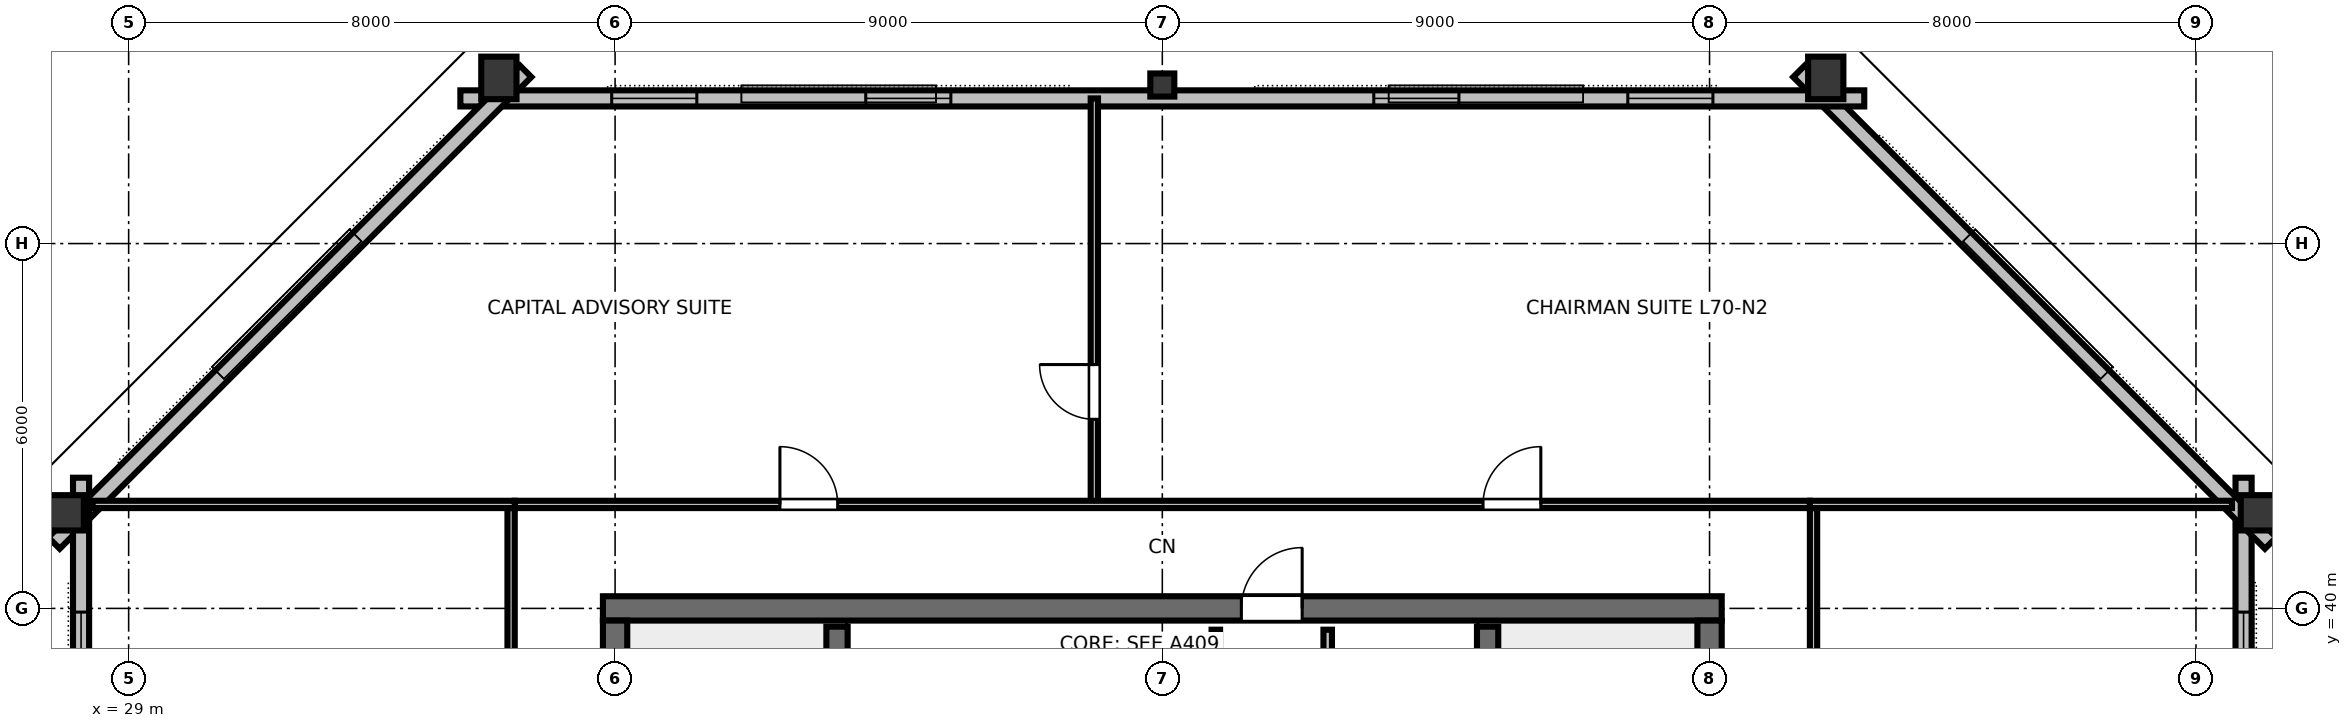
"""IFC4 building model, lengths in metres.
Left out: names, types, materials, properties, quantities, classifications, styles, units other than length and angle.
Written with IfcOpenShell. Run it as: python <this file> out.ifc"""

import sys

from ifc_helpers import new_model, si_unit, direction, frame, frame_2d, origin, origin_2d, place, context, subcontext, project, spatial, rectangle, hollow_rectangle, i_section, extrude, element, fill, save


model = new_model("IFC4")
c1 = context("Model", 3, precision=1e-05, world=origin(), true_north=direction((0.0, 1.0)))
c2 = subcontext(c1, "Body", "Model", "MODEL_VIEW")
j1 = project(units=[si_unit("LENGTHUNIT", "METRE"), si_unit("PLANEANGLEUNIT", "RADIAN")], contexts=[c1])
p1 = place(None, origin())
s1 = spatial("IfcSite", under=j1, at=p1, CompositionType="ELEMENT")
p2 = place(p1, origin())
s2 = spatial("IfcBuilding", under=s1, at=p2, CompositionType="ELEMENT")
p3 = place(p2, frame((0.0, 0.0, 264.6)))
s3 = spatial("IfcBuildingStorey", under=s2, at=p3, CompositionType="ELEMENT", Elevation=264.6)
p4 = place(p3, frame((36.8, 40.0, 0.0), z_axis=(0.0, 0.0, 1.0), x_axis=(1.0, 0.0, 0.0)))
e1 = element("IfcWall", 1, at=p4, inside=s3, PredefinedType="SHEAR", context=c2, shape_type="SweptSolid", body=[
    extrude(rectangle(XDim=18.4, YDim=0.4, at=frame_2d((9.2, 0.0))), origin(), (0.0, 0.0, 1.0), 3.36),
])
p5 = place(p4, frame((10.5, 0.0, 0.0)))
e2 = element("IfcOpeningElement", 2, at=p5, cuts=e1, PredefinedType="OPENING", context=c2, shape_type="SweptSolid", body=[
    extrude(rectangle(XDim=1.0, YDim=2.15, at=frame_2d((0.5, 1.075))), frame((0.0, 0.21, 0.0), z_axis=(0.0, -1.0, 0.0), x_axis=(1.0, 0.0, 0.0)), (0.0, 0.0, 1.0), 0.42),
])
p6 = place(p3, frame((37.0, 24.2, 0.0), z_axis=(0.0, 0.0, 1.0), x_axis=(0.0, 1.0, 0.0)))
e3 = element("IfcWall", 3, at=p6, inside=s3, PredefinedType="SHEAR", context=c2, shape_type="SweptSolid", body=[
    extrude(rectangle(XDim=15.6, YDim=0.4, at=frame_2d((7.8, 0.0))), origin(), (0.0, 0.0, 1.0), 3.36),
])
p7 = place(p6, frame((5.325, 0.0, 0.0)))
e4 = element("IfcOpeningElement", 4, at=p7, cuts=e3, PredefinedType="OPENING", context=c2, shape_type="SweptSolid", body=[
    extrude(rectangle(XDim=1.15, YDim=2.15, at=frame_2d((0.575, 1.075))), frame((0.0, 0.21, 0.0), z_axis=(0.0, -1.0, 0.0), x_axis=(1.0, 0.0, 0.0)), (0.0, 0.0, 1.0), 0.42),
])
p8 = place(p3, frame((55.0, 24.2, 0.0), z_axis=(0.0, 0.0, 1.0), x_axis=(0.0, 1.0, 0.0)))
e5 = element("IfcWall", 5, at=p8, inside=s3, PredefinedType="SHEAR", context=c2, shape_type="SweptSolid", body=[
    extrude(rectangle(XDim=15.6, YDim=0.4, at=frame_2d((7.8, 0.0))), origin(), (0.0, 0.0, 1.0), 3.36),
])
p9 = place(p8, frame((5.325, 0.0, 0.0)))
e6 = element("IfcOpeningElement", 6, at=p9, cuts=e5, PredefinedType="OPENING", context=c2, shape_type="SweptSolid", body=[
    extrude(rectangle(XDim=1.15, YDim=2.15, at=frame_2d((0.575, 1.075))), frame((0.0, 0.21, 0.0), z_axis=(0.0, -1.0, 0.0), x_axis=(1.0, 0.0, 0.0)), (0.0, 0.0, 1.0), 0.42),
])
for number, where, z_axis, x_axis in (
    (7, (64.086, 41.572, 0.0), (0.0, 0.0, 1.0), (0.0, 1.0, 0.0)),
    (8, (56.911, 48.724, 0.0), (0.0, 0.0, 1.0), (1.0, 0.0, 0.0)),
):
    element("IfcColumn", number, at=place(p3, frame(where, z_axis=z_axis, x_axis=x_axis)), inside=s3, PredefinedType="COLUMN", context=c2, shape_type="SweptSolid", body=[
        extrude(hollow_rectangle(XDim=0.58, YDim=0.7, WallThickness=0.032, at=origin_2d()), origin(), (0.0, 0.0, 1.0), 3.373),
    ])
p10 = place(p3, frame((46.0, 48.607, 0.0), z_axis=(0.0, 0.0, 1.0), x_axis=(1.0, 0.0, 0.0)))
e9 = element("IfcColumn", 9, at=p10, inside=s3, PredefinedType="COLUMN", context=c2, shape_type="SweptSolid", body=[
    extrude(i_section(OverallWidth=0.395, OverallDepth=0.38, WebThickness=0.019, FlangeThickness=0.03, FilletRadius=0.025, at=origin_2d()), origin(), (0.0, 0.0, 1.0), 3.373),
])
for number, where, z_axis, x_axis in (
    (10, (35.089, 48.724, 0.0), (0.0, 0.0, 1.0), (1.0, 0.0, 0.0)),
    (11, (27.914, 41.572, 0.0), (0.0, 0.0, 1.0), (0.0, 1.0, 0.0)),
):
    element("IfcColumn", number, at=place(p3, frame(where, z_axis=z_axis, x_axis=x_axis)), inside=s3, PredefinedType="COLUMN", context=c2, shape_type="SweptSolid", body=[
        extrude(hollow_rectangle(XDim=0.58, YDim=0.7, WallThickness=0.032, at=origin_2d()), origin(), (0.0, 0.0, 1.0), 3.373),
    ])
p11 = place(p3, frame((63.783, 21.851, 0.0), z_axis=(0.0, 0.0, 1.0), x_axis=(0.0, 1.0, 0.0)))
e12 = element("IfcWall", 12, at=p11, inside=s3, PredefinedType="STANDARD", context=c2, shape_type="SweptSolid", body=[
    extrude(rectangle(XDim=20.298, YDim=0.265, at=frame_2d((10.149, 0.0))), origin(), (0.0, 0.0, 1.0), 2.832),
])
p12 = place(p11, frame((2.21, 0.0, 0.85)))
e13 = element("IfcOpeningElement", 13, at=p12, cuts=e12, PredefinedType="OPENING", context=c2, shape_type="SweptSolid", body=[
    extrude(rectangle(XDim=1.4, YDim=1.2, at=frame_2d((0.7, 0.6))), frame((0.0, 0.142, 0.0), z_axis=(0.0, -1.0, 0.0), x_axis=(1.0, 0.0, 0.0)), (0.0, 0.0, 1.0), 0.285),
])
p13 = place(p11, frame((5.83, 0.0, 0.85)))
e14 = element("IfcOpeningElement", 14, at=p13, cuts=e12, PredefinedType="OPENING", context=c2, shape_type="SweptSolid", body=[
    extrude(rectangle(XDim=1.4, YDim=1.2, at=frame_2d((0.7, 0.6))), frame((0.0, 0.142, 0.0), z_axis=(0.0, -1.0, 0.0), x_axis=(1.0, 0.0, 0.0)), (0.0, 0.0, 1.0), 0.285),
])
p14 = place(p11, frame((13.069, 0.0, 0.85)))
e15 = element("IfcOpeningElement", 15, at=p14, cuts=e12, PredefinedType="OPENING", context=c2, shape_type="SweptSolid", body=[
    extrude(rectangle(XDim=1.4, YDim=1.2, at=frame_2d((0.7, 0.6))), frame((0.0, 0.142, 0.0), z_axis=(0.0, -1.0, 0.0), x_axis=(1.0, 0.0, 0.0)), (0.0, 0.0, 1.0), 0.285),
])
p15 = place(p11, frame((16.688, 0.0, 0.85)))
e16 = element("IfcOpeningElement", 16, at=p15, cuts=e12, PredefinedType="OPENING", context=c2, shape_type="SweptSolid", body=[
    extrude(rectangle(XDim=1.4, YDim=1.2, at=frame_2d((0.7, 0.6))), frame((0.0, 0.142, 0.0), z_axis=(0.0, -1.0, 0.0), x_axis=(1.0, 0.0, 0.0)), (0.0, 0.0, 1.0), 0.285),
])
p16 = place(p3, frame((64.228, 41.075, 0.0), z_axis=(0.0, 0.0, 1.0), x_axis=(-0.707106781187, 0.707106781187, 0.0)))
e17 = element("IfcWall", 17, at=p16, inside=s3, PredefinedType="STANDARD", context=c2, shape_type="SweptSolid", body=[
    extrude(rectangle(XDim=10.971, YDim=0.265, at=frame_2d((5.485, 0.0))), origin(), (0.0, 0.0, 1.0), 2.832),
])
p17 = place(p3, frame((57.544, 48.387, 0.0), z_axis=(0.0, 0.0, 1.0), x_axis=(-1.0, 0.0, 0.0)))
e18 = element("IfcWall", 18, at=p17, inside=s3, PredefinedType="STANDARD", context=c2, shape_type="SweptSolid", body=[
    extrude(rectangle(XDim=23.089, YDim=0.265, at=frame_2d((11.544, 0.0))), origin(), (0.0, 0.0, 1.0), 2.832),
])
p18 = place(p17, frame((2.489, 0.0, 0.85)))
e19 = element("IfcOpeningElement", 19, at=p18, cuts=e18, PredefinedType="OPENING", context=c2, shape_type="SweptSolid", body=[
    extrude(rectangle(XDim=1.4, YDim=1.2, at=frame_2d((0.7, 0.6))), frame((0.0, 0.142, 0.0), z_axis=(0.0, -1.0, 0.0), x_axis=(1.0, 0.0, 0.0)), (0.0, 0.0, 1.0), 0.285),
])
p19 = place(p17, frame((6.667, 0.0, 0.85)))
e20 = element("IfcOpeningElement", 20, at=p19, cuts=e18, PredefinedType="OPENING", context=c2, shape_type="SweptSolid", body=[
    extrude(rectangle(XDim=1.4, YDim=1.2, at=frame_2d((0.7, 0.6))), frame((0.0, 0.142, 0.0), z_axis=(0.0, -1.0, 0.0), x_axis=(1.0, 0.0, 0.0)), (0.0, 0.0, 1.0), 0.285),
])
p20 = place(p17, frame((15.022, 0.0, 0.85)))
e21 = element("IfcOpeningElement", 21, at=p20, cuts=e18, PredefinedType="OPENING", context=c2, shape_type="SweptSolid", body=[
    extrude(rectangle(XDim=1.4, YDim=1.2, at=frame_2d((0.7, 0.6))), frame((0.0, 0.142, 0.0), z_axis=(0.0, -1.0, 0.0), x_axis=(1.0, 0.0, 0.0)), (0.0, 0.0, 1.0), 0.285),
])
p21 = place(p17, frame((19.2, 0.0, 0.85)))
e22 = element("IfcOpeningElement", 22, at=p21, cuts=e18, PredefinedType="OPENING", context=c2, shape_type="SweptSolid", body=[
    extrude(rectangle(XDim=1.4, YDim=1.2, at=frame_2d((0.7, 0.6))), frame((0.0, 0.142, 0.0), z_axis=(0.0, -1.0, 0.0), x_axis=(1.0, 0.0, 0.0)), (0.0, 0.0, 1.0), 0.285),
])
p22 = place(p3, frame((35.53, 48.832, 0.0), z_axis=(0.0, 0.0, 1.0), x_axis=(-0.707106781187, -0.707106781187, 0.0)))
e23 = element("IfcWall", 23, at=p22, inside=s3, PredefinedType="STANDARD", context=c2, shape_type="SweptSolid", body=[
    extrude(rectangle(XDim=10.971, YDim=0.265, at=frame_2d((5.485, 0.0))), origin(), (0.0, 0.0, 1.0), 2.832),
])
p23 = place(p3, frame((28.217, 42.149, 0.0), z_axis=(0.0, 0.0, 1.0), x_axis=(0.0, -1.0, 0.0)))
e24 = element("IfcWall", 24, at=p23, inside=s3, PredefinedType="STANDARD", context=c2, shape_type="SweptSolid", body=[
    extrude(rectangle(XDim=20.298, YDim=0.265, at=frame_2d((10.149, 0.0))), origin(), (0.0, 0.0, 1.0), 2.832),
])
p24 = place(p23, frame((2.21, 0.0, 0.85)))
e25 = element("IfcOpeningElement", 25, at=p24, cuts=e24, PredefinedType="OPENING", context=c2, shape_type="SweptSolid", body=[
    extrude(rectangle(XDim=1.4, YDim=1.2, at=frame_2d((0.7, 0.6))), frame((0.0, 0.142, 0.0), z_axis=(0.0, -1.0, 0.0), x_axis=(1.0, 0.0, 0.0)), (0.0, 0.0, 1.0), 0.285),
])
p25 = place(p23, frame((5.83, 0.0, 0.85)))
e26 = element("IfcOpeningElement", 26, at=p25, cuts=e24, PredefinedType="OPENING", context=c2, shape_type="SweptSolid", body=[
    extrude(rectangle(XDim=1.4, YDim=1.2, at=frame_2d((0.7, 0.6))), frame((0.0, 0.142, 0.0), z_axis=(0.0, -1.0, 0.0), x_axis=(1.0, 0.0, 0.0)), (0.0, 0.0, 1.0), 0.285),
])
p26 = place(p23, frame((16.688, 0.0, 0.85)))
e27 = element("IfcOpeningElement", 27, at=p26, cuts=e24, PredefinedType="OPENING", context=c2, shape_type="SweptSolid", body=[
    extrude(rectangle(XDim=1.4, YDim=1.2, at=frame_2d((0.7, 0.6))), frame((0.0, 0.142, 0.0), z_axis=(0.0, -1.0, 0.0), x_axis=(1.0, 0.0, 0.0)), (0.0, 0.0, 1.0), 0.285),
])
for number, where, z_axis, x_axis in (
    (28, (40.65, 32.0, 0.0), (0.0, 0.0, 1.0), (0.0, 1.0, 0.0)),
    (29, (51.35, 32.0, 0.0), (0.0, 0.0, 1.0), (0.0, 1.0, 0.0)),
):
    element("IfcWall", number, at=place(p3, frame(where, z_axis=z_axis, x_axis=x_axis)), inside=s3, PredefinedType="SHEAR", context=c2, shape_type="SweptSolid", body=[
        extrude(rectangle(XDim=7.7, YDim=0.35, at=frame_2d((3.85, 0.0))), origin(), (0.0, 0.0, 1.0), 3.6),
    ])
p27 = place(p3, frame((46.88, 32.05, 0.0), z_axis=(0.0, 0.0, 1.0), x_axis=(0.0, 1.0, 0.0)))
e30 = element("IfcWall", 30, at=p27, inside=s3, PredefinedType="PARTITIONING", context=c2, shape_type="SweptSolid", body=[
    extrude(rectangle(XDim=7.6, YDim=0.14, at=frame_2d((3.8, 0.0))), origin(), (0.0, 0.0, 1.0), 3.375),
])
p28 = place(p27, frame((3.4, 0.0, 0.0)))
e31 = element("IfcOpeningElement", 31, at=p28, cuts=e30, PredefinedType="OPENING", context=c2, shape_type="SweptSolid", body=[
    extrude(rectangle(XDim=0.95, YDim=2.15, at=frame_2d((0.475, 1.075))), frame((0.0, 0.08, 0.0), z_axis=(0.0, -1.0, 0.0), x_axis=(1.0, 0.0, 0.0)), (0.0, 0.0, 1.0), 0.16),
])
p29 = place(p3, frame((48.72, 32.05, 0.0), z_axis=(0.0, 0.0, 1.0), x_axis=(0.0, 1.0, 0.0)))
e32 = element("IfcWall", 32, at=p29, inside=s3, PredefinedType="PARTITIONING", context=c2, shape_type="SweptSolid", body=[
    extrude(rectangle(XDim=7.6, YDim=0.14, at=frame_2d((3.8, 0.0))), origin(), (0.0, 0.0, 1.0), 3.375),
])
p30 = place(p29, frame((0.8, 0.0, 0.0)))
e33 = element("IfcOpeningElement", 33, at=p30, cuts=e32, PredefinedType="OPENING", context=c2, shape_type="SweptSolid", body=[
    extrude(rectangle(XDim=0.9, YDim=2.15, at=frame_2d((0.45, 1.075))), frame((0.0, 0.08, 0.0), z_axis=(0.0, -1.0, 0.0), x_axis=(1.0, 0.0, 0.0)), (0.0, 0.0, 1.0), 0.16),
])
p31 = place(p29, frame((3.35, 0.0, 0.0)))
e34 = element("IfcOpeningElement", 34, at=p31, cuts=e32, PredefinedType="OPENING", context=c2, shape_type="SweptSolid", body=[
    extrude(rectangle(XDim=0.9, YDim=2.15, at=frame_2d((0.45, 1.075))), frame((0.0, 0.08, 0.0), z_axis=(0.0, -1.0, 0.0), x_axis=(1.0, 0.0, 0.0)), (0.0, 0.0, 1.0), 0.16),
])
p32 = place(p29, frame((5.9, 0.0, 0.0)))
e35 = element("IfcOpeningElement", 35, at=p32, cuts=e32, PredefinedType="OPENING", context=c2, shape_type="SweptSolid", body=[
    extrude(rectangle(XDim=0.92, YDim=2.15, at=frame_2d((0.46, 1.075))), frame((0.0, 0.08, 0.0), z_axis=(0.0, -1.0, 0.0), x_axis=(1.0, 0.0, 0.0)), (0.0, 0.0, 1.0), 0.16),
])
p33 = place(p3, frame((44.882, 41.71, 0.0), z_axis=(0.0, 0.0, 1.0), x_axis=(0.0, 1.0, 0.0)))
e36 = element("IfcWall", 36, at=p33, inside=s3, PredefinedType="PARTITIONING", context=c2, shape_type="SweptSolid", body=[
    extrude(rectangle(XDim=6.677, YDim=0.12, at=frame_2d((3.339, 0.0))), origin(), (0.0, 0.0, 1.0), 2.655),
])
p34 = place(p33, frame((1.4, 0.0, 0.0)))
e37 = element("IfcOpeningElement", 37, at=p34, cuts=e36, PredefinedType="OPENING", context=c2, shape_type="SweptSolid", body=[
    extrude(rectangle(XDim=0.9, YDim=2.15, at=frame_2d((0.45, 1.075))), frame((0.0, 0.07, 0.0), z_axis=(0.0, -1.0, 0.0), x_axis=(1.0, 0.0, 0.0)), (0.0, 0.0, 1.0), 0.14),
])
p35 = place(p3, frame((35.35, 41.71, 0.0), z_axis=(0.0, 0.0, 1.0), x_axis=(1.0, 0.0, 0.0)))
e38 = element("IfcWall", 38, at=p35, inside=s3, PredefinedType="PARTITIONING", context=c2, shape_type="SweptSolid", body=[
    extrude(rectangle(XDim=21.3, YDim=0.12, at=frame_2d((10.65, 0.0))), origin(), (0.0, 0.0, 1.0), 2.655),
])
p36 = place(p35, frame((4.361, 0.0, 0.0)))
e39 = element("IfcOpeningElement", 39, at=p36, cuts=e38, PredefinedType="OPENING", context=c2, shape_type="SweptSolid", body=[
    extrude(rectangle(XDim=0.95, YDim=2.15, at=frame_2d((0.475, 1.075))), frame((0.0, 0.07, 0.0), z_axis=(0.0, -1.0, 0.0), x_axis=(1.0, 0.0, 0.0)), (0.0, 0.0, 1.0), 0.14),
])
p37 = place(p35, frame((15.925, 0.0, 0.0)))
e40 = element("IfcOpeningElement", 40, at=p37, cuts=e38, PredefinedType="OPENING", context=c2, shape_type="SweptSolid", body=[
    extrude(rectangle(XDim=0.95, YDim=2.15, at=frame_2d((0.475, 1.075))), frame((0.0, 0.07, 0.0), z_axis=(0.0, -1.0, 0.0), x_axis=(1.0, 0.0, 0.0)), (0.0, 0.0, 1.0), 0.14),
])
p38 = place(p3, frame((35.29, 22.35, 0.0), z_axis=(0.0, 0.0, 1.0), x_axis=(0.0, 1.0, 0.0)))
e41 = element("IfcWall", 41, at=p38, inside=s3, PredefinedType="PARTITIONING", context=c2, shape_type="SweptSolid", body=[
    extrude(rectangle(XDim=19.3, YDim=0.12, at=frame_2d((9.65, 0.0))), origin(), (0.0, 0.0, 1.0), 2.655),
])
p39 = place(p38, frame((2.847, 0.0, 0.0)))
e42 = element("IfcOpeningElement", 42, at=p39, cuts=e41, PredefinedType="OPENING", context=c2, shape_type="SweptSolid", body=[
    extrude(rectangle(XDim=0.95, YDim=2.15, at=frame_2d((0.475, 1.075))), frame((0.0, 0.07, 0.0), z_axis=(0.0, -1.0, 0.0), x_axis=(1.0, 0.0, 0.0)), (0.0, 0.0, 1.0), 0.14),
])
p40 = place(p38, frame((8.606, 0.0, 0.0)))
e43 = element("IfcOpeningElement", 43, at=p40, cuts=e41, PredefinedType="OPENING", context=c2, shape_type="SweptSolid", body=[
    extrude(rectangle(XDim=0.95, YDim=2.15, at=frame_2d((0.475, 1.075))), frame((0.0, 0.07, 0.0), z_axis=(0.0, -1.0, 0.0), x_axis=(1.0, 0.0, 0.0)), (0.0, 0.0, 1.0), 0.14),
])
p41 = place(p38, frame((14.935, 0.0, 0.0)))
e44 = element("IfcOpeningElement", 44, at=p41, cuts=e41, PredefinedType="OPENING", context=c2, shape_type="SweptSolid", body=[
    extrude(rectangle(XDim=0.95, YDim=2.15, at=frame_2d((0.475, 1.075))), frame((0.0, 0.07, 0.0), z_axis=(0.0, -1.0, 0.0), x_axis=(1.0, 0.0, 0.0)), (0.0, 0.0, 1.0), 0.14),
])
p42 = place(p3, frame((56.71, 22.35, 0.0), z_axis=(0.0, 0.0, 1.0), x_axis=(0.0, 1.0, 0.0)))
e45 = element("IfcWall", 45, at=p42, inside=s3, PredefinedType="PARTITIONING", context=c2, shape_type="SweptSolid", body=[
    extrude(rectangle(XDim=19.3, YDim=0.12, at=frame_2d((9.65, 0.0))), origin(), (0.0, 0.0, 1.0), 2.655),
])
p43 = place(p42, frame((3.646, 0.0, 0.0)))
e46 = element("IfcOpeningElement", 46, at=p43, cuts=e45, PredefinedType="OPENING", context=c2, shape_type="SweptSolid", body=[
    extrude(rectangle(XDim=0.95, YDim=2.15, at=frame_2d((0.475, 1.075))), frame((0.0, 0.07, 0.0), z_axis=(0.0, -1.0, 0.0), x_axis=(1.0, 0.0, 0.0)), (0.0, 0.0, 1.0), 0.14),
])
p44 = place(p42, frame((13.096, 0.0, 0.0)))
e47 = element("IfcOpeningElement", 47, at=p44, cuts=e45, PredefinedType="OPENING", context=c2, shape_type="SweptSolid", body=[
    extrude(rectangle(XDim=0.95, YDim=2.15, at=frame_2d((0.475, 1.075))), frame((0.0, 0.07, 0.0), z_axis=(0.0, -1.0, 0.0), x_axis=(1.0, 0.0, 0.0)), (0.0, 0.0, 1.0), 0.14),
])
for number, where, z_axis, x_axis in (
    (48, (35.35, 41.71, 0.0), (0.0, 0.0, 1.0), (-1.0, 0.0, 0.0)),
    (49, (56.65, 41.71, 0.0), (0.0, 0.0, 1.0), (1.0, 0.0, 0.0)),
):
    element("IfcWall", number, at=place(p3, frame(where, z_axis=z_axis, x_axis=x_axis)), inside=s3, PredefinedType="PARTITIONING", context=c2, shape_type="SweptSolid", body=[
        extrude(rectangle(XDim=6.942, YDim=0.12, at=frame_2d((3.471, 0.0))), origin(), (0.0, 0.0, 1.0), 2.655),
    ])
p45 = place(p15, origin())
e50 = element("IfcWindow", 50, at=p45, inside=s3, PartitioningType="SINGLE_PANEL", PredefinedType="WINDOW", context=c2, shape_type="SweptSolid", body=[
    extrude(rectangle(XDim=1.4, YDim=1.2, at=frame_2d((0.7, 0.6))), frame((0.0, 0.03, 0.0), z_axis=(0.0, -1.0, 0.0), x_axis=(1.0, 0.0, 0.0)), (0.0, 0.0, 1.0), 0.06),
])
fill(e16, e50)
p46 = place(p18, origin())
e51 = element("IfcWindow", 51, at=p46, inside=s3, PartitioningType="SINGLE_PANEL", PredefinedType="WINDOW", context=c2, shape_type="SweptSolid", body=[
    extrude(rectangle(XDim=1.4, YDim=1.2, at=frame_2d((0.7, 0.6))), frame((0.0, 0.03, 0.0), z_axis=(0.0, -1.0, 0.0), x_axis=(1.0, 0.0, 0.0)), (0.0, 0.0, 1.0), 0.06),
])
fill(e19, e51)
p47 = place(p19, origin())
e52 = element("IfcWindow", 52, at=p47, inside=s3, PartitioningType="SINGLE_PANEL", PredefinedType="WINDOW", context=c2, shape_type="SweptSolid", body=[
    extrude(rectangle(XDim=1.4, YDim=1.2, at=frame_2d((0.7, 0.6))), frame((0.0, 0.03, 0.0), z_axis=(0.0, -1.0, 0.0), x_axis=(1.0, 0.0, 0.0)), (0.0, 0.0, 1.0), 0.06),
])
fill(e20, e52)
p48 = place(p20, origin())
e53 = element("IfcWindow", 53, at=p48, inside=s3, PartitioningType="SINGLE_PANEL", PredefinedType="WINDOW", context=c2, shape_type="SweptSolid", body=[
    extrude(rectangle(XDim=1.4, YDim=1.2, at=frame_2d((0.7, 0.6))), frame((0.0, 0.03, 0.0), z_axis=(0.0, -1.0, 0.0), x_axis=(1.0, 0.0, 0.0)), (0.0, 0.0, 1.0), 0.06),
])
fill(e21, e53)
p49 = place(p21, origin())
e54 = element("IfcWindow", 54, at=p49, inside=s3, PartitioningType="SINGLE_PANEL", PredefinedType="WINDOW", context=c2, shape_type="SweptSolid", body=[
    extrude(rectangle(XDim=1.4, YDim=1.2, at=frame_2d((0.7, 0.6))), frame((0.0, 0.03, 0.0), z_axis=(0.0, -1.0, 0.0), x_axis=(1.0, 0.0, 0.0)), (0.0, 0.0, 1.0), 0.06),
])
fill(e22, e54)
p50 = place(p24, origin())
e55 = element("IfcWindow", 55, at=p50, inside=s3, PartitioningType="SINGLE_PANEL", PredefinedType="WINDOW", context=c2, shape_type="SweptSolid", body=[
    extrude(rectangle(XDim=1.4, YDim=1.2, at=frame_2d((0.7, 0.6))), frame((0.0, 0.03, 0.0), z_axis=(0.0, -1.0, 0.0), x_axis=(1.0, 0.0, 0.0)), (0.0, 0.0, 1.0), 0.06),
])
fill(e25, e55)
p51 = place(p5, origin())
e56 = element("IfcDoor", 56, at=p51, inside=s3, OperationType="SINGLE_SWING_RIGHT", PredefinedType="DOOR", context=c2, shape_type="SweptSolid", body=[
    extrude(rectangle(XDim=1.0, YDim=2.15, at=frame_2d((0.5, 1.075))), frame((0.0, 0.025, 0.0), z_axis=(0.0, -1.0, 0.0), x_axis=(1.0, 0.0, 0.0)), (0.0, 0.0, 1.0), 0.05),
])
fill(e2, e56)
p52 = place(p34, origin())
e57 = element("IfcDoor", 57, at=p52, inside=s3, OperationType="SINGLE_SWING_RIGHT", PredefinedType="DOOR", context=c2, shape_type="SweptSolid", body=[
    extrude(rectangle(XDim=0.9, YDim=2.15, at=frame_2d((0.45, 1.075))), frame((0.0, 0.025, 0.0), z_axis=(0.0, -1.0, 0.0), x_axis=(1.0, 0.0, 0.0)), (0.0, 0.0, 1.0), 0.05),
])
fill(e37, e57)
p53 = place(p36, origin())
e58 = element("IfcDoor", 58, at=p53, inside=s3, OperationType="SINGLE_SWING_LEFT", PredefinedType="DOOR", context=c2, shape_type="SweptSolid", body=[
    extrude(rectangle(XDim=0.95, YDim=2.15, at=frame_2d((0.475, 1.075))), frame((0.0, 0.025, 0.0), z_axis=(0.0, -1.0, 0.0), x_axis=(1.0, 0.0, 0.0)), (0.0, 0.0, 1.0), 0.05),
])
fill(e39, e58)
p54 = place(p37, origin())
e59 = element("IfcDoor", 59, at=p54, inside=s3, OperationType="SINGLE_SWING_RIGHT", PredefinedType="DOOR", context=c2, shape_type="SweptSolid", body=[
    extrude(rectangle(XDim=0.95, YDim=2.15, at=frame_2d((0.475, 1.075))), frame((0.0, 0.025, 0.0), z_axis=(0.0, -1.0, 0.0), x_axis=(1.0, 0.0, 0.0)), (0.0, 0.0, 1.0), 0.05),
])
fill(e40, e59)
save(model, sys.argv[1])
